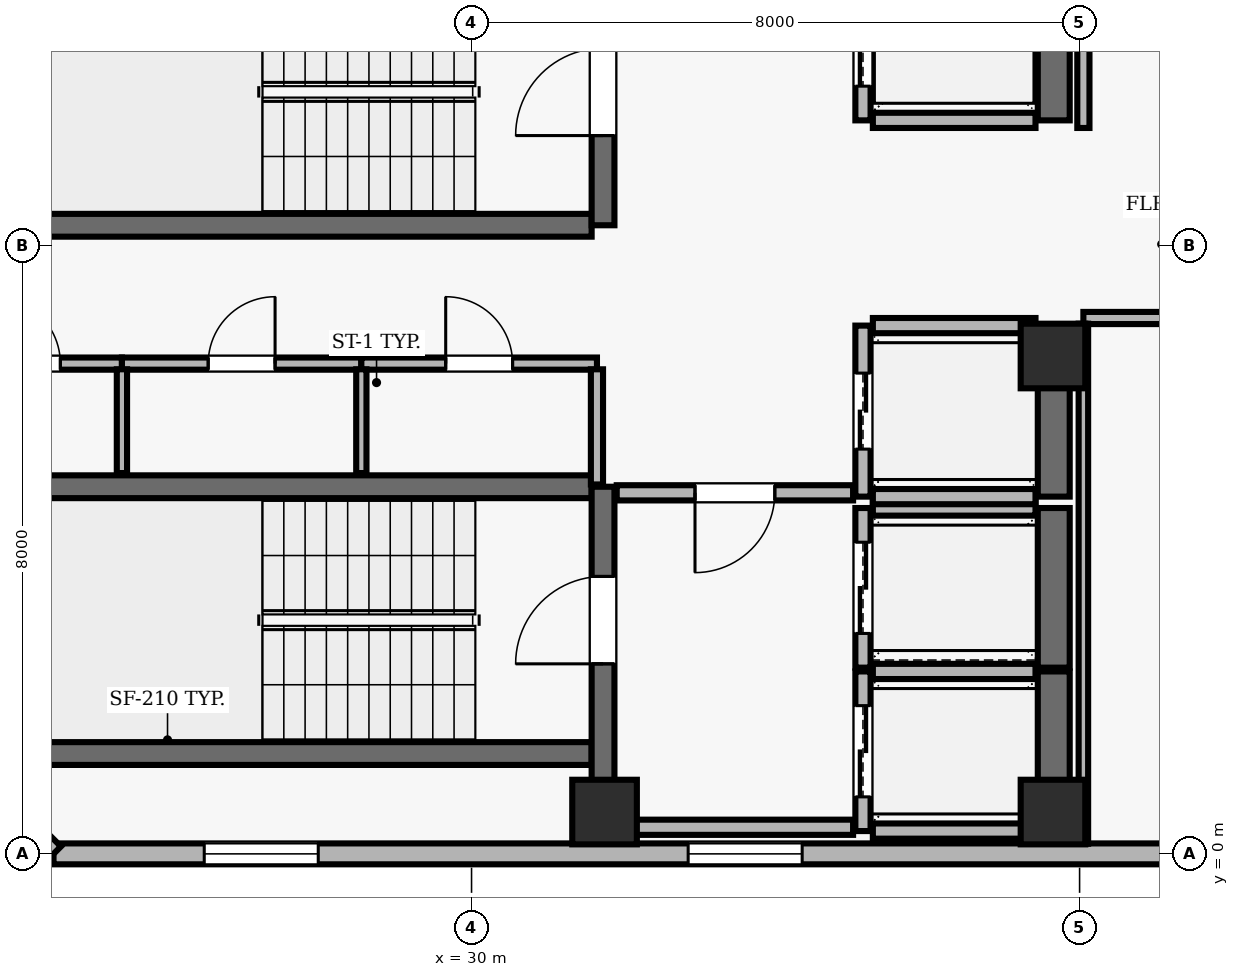
"""IFC4 building model, lengths in metres.
Left out: names, types, materials, properties, quantities, classifications, styles, units other than length and angle.
Written with IfcOpenShell. Run it as: python <this file> out.ifc"""

import sys

from ifc_helpers import new_model, si_unit, direction, frame, frame_2d, origin, origin_2d, place, context, subcontext, project, spatial, rectangle, extrude, element, fill, save


model = new_model("IFC4")
c1 = context("Model", 3, precision=1e-05, world=origin(), true_north=direction((0.0, 1.0)))
c2 = subcontext(c1, "Body", "Model", "MODEL_VIEW")
j1 = project(units=[si_unit("LENGTHUNIT", "METRE"), si_unit("PLANEANGLEUNIT", "RADIAN")], contexts=[c1])
p1 = place(None, origin())
s1 = spatial("IfcSite", under=j1, at=p1, CompositionType="ELEMENT")
p2 = place(p1, origin())
s2 = spatial("IfcBuilding", under=s1, at=p2, CompositionType="ELEMENT")
p3 = place(p2, frame((0.0, 0.0, 252.1)))
s3 = spatial("IfcBuildingStorey", under=s2, at=p3, CompositionType="ELEMENT", Elevation=252.1)
for number, where, z_axis, x_axis in (
    (1, (31.75, 0.55, 0.0), (0.0, 0.0, 1.0), (1.0, 0.0, 0.0)),
    (2, (37.65, 0.55, 0.0), (0.0, 0.0, 1.0), (1.0, 0.0, 0.0)),
    (3, (37.65, 6.55, 0.0), (0.0, 0.0, 1.0), (1.0, 0.0, 0.0)),
):
    element("IfcColumn", number, at=place(p3, frame(where, z_axis=z_axis, x_axis=x_axis)), inside=s3, PredefinedType="COLUMN", context=c2, shape_type="SweptSolid", body=[
        extrude(rectangle(XDim=0.85, YDim=0.85, at=origin_2d()), origin(), (0.0, 0.0, 1.0), 3.9),
    ])
p4 = place(p3, frame((24.5, 0.0, 0.0), z_axis=(0.0, 0.0, 1.0), x_axis=(1.0, 0.0, 0.0)))
e4 = element("IfcWall", 4, at=p4, inside=s3, PredefinedType="SOLIDWALL", context=c2, shape_type="SweptSolid", body=[
    extrude(rectangle(XDim=32.8, YDim=0.275, at=frame_2d((16.4, 0.0))), origin(), (0.0, 0.0, 1.0), 3.69),
])
p5 = place(p4, frame((1.983, 0.0, 0.9)))
e5 = element("IfcOpeningElement", 5, at=p5, cuts=e4, PredefinedType="OPENING", context=c2, shape_type="SweptSolid", body=[
    extrude(rectangle(XDim=1.5, YDim=1.6, at=frame_2d((0.75, 0.8))), frame((0.0, 0.147, 0.0), z_axis=(0.0, -1.0, 0.0), x_axis=(1.0, 0.0, 0.0)), (0.0, 0.0, 1.0), 0.295),
])
p6 = place(p4, frame((8.35, 0.0, 0.9)))
e6 = element("IfcOpeningElement", 6, at=p6, cuts=e4, PredefinedType="OPENING", context=c2, shape_type="SweptSolid", body=[
    extrude(rectangle(XDim=1.5, YDim=1.6, at=frame_2d((0.75, 0.8))), frame((0.0, 0.147, 0.0), z_axis=(0.0, -1.0, 0.0), x_axis=(1.0, 0.0, 0.0)), (0.0, 0.0, 1.0), 0.295),
])
p7 = place(p3, frame((22.0, 2.5, 0.0), z_axis=(0.0, 0.0, 1.0), x_axis=(0.707106781187, -0.707106781187, 0.0)))
e7 = element("IfcWall", 7, at=p7, inside=s3, PredefinedType="SOLIDWALL", context=c2, shape_type="SweptSolid", body=[
    extrude(rectangle(XDim=3.536, YDim=0.275, at=frame_2d((1.768, 0.0))), origin(), (0.0, 0.0, 1.0), 3.69),
])
for number, where, z_axis, x_axis in (
    (8, (31.58, 4.83, 0.0), (0.0, 0.0, 1.0), (-1.0, 0.0, 0.0)),
    (9, (23.22, 1.32, 0.0), (0.0, 0.0, 1.0), (1.0, 0.0, 0.0)),
):
    element("IfcWall", number, at=place(p3, frame(where, z_axis=z_axis, x_axis=x_axis)), inside=s3, PredefinedType="SHEAR", context=c2, shape_type="SweptSolid", body=[
        extrude(rectangle(XDim=8.36, YDim=0.3, at=frame_2d((4.18, 0.0))), origin(), (0.0, 0.0, 1.0), 3.69),
    ])
p8 = place(p3, frame((31.73, 0.96, 0.0), z_axis=(0.0, 0.0, 1.0), x_axis=(0.0, 1.0, 0.0)))
e10 = element("IfcWall", 10, at=p8, inside=s3, PredefinedType="SHEAR", context=c2, shape_type="SweptSolid", body=[
    extrude(rectangle(XDim=3.87, YDim=0.3, at=frame_2d((1.935, 0.0))), origin(), (0.0, 0.0, 1.0), 3.69),
])
p9 = place(p8, frame((1.54, 0.0, 0.0)))
e11 = element("IfcOpeningElement", 11, at=p9, cuts=e10, PredefinedType="OPENING", context=c2, shape_type="SweptSolid", body=[
    extrude(rectangle(XDim=1.15, YDim=2.15, at=frame_2d((0.575, 1.075))), frame((0.0, 0.16, 0.0), z_axis=(0.0, -1.0, 0.0), x_axis=(1.0, 0.0, 0.0)), (0.0, 0.0, 1.0), 0.32),
])
p10 = place(p3, frame((23.22, 8.27, 0.0), z_axis=(0.0, 0.0, 1.0), x_axis=(1.0, 0.0, 0.0)))
e12 = element("IfcWall", 12, at=p10, inside=s3, PredefinedType="SHEAR", context=c2, shape_type="SweptSolid", body=[
    extrude(rectangle(XDim=8.36, YDim=0.3, at=frame_2d((4.18, 0.0))), origin(), (0.0, 0.0, 1.0), 3.69),
])
p11 = place(p3, frame((31.73, 8.27, 0.0), z_axis=(0.0, 0.0, 1.0), x_axis=(0.0, 1.0, 0.0)))
e13 = element("IfcWall", 13, at=p11, inside=s3, PredefinedType="SHEAR", context=c2, shape_type="SweptSolid", body=[
    extrude(rectangle(XDim=3.51, YDim=0.3, at=frame_2d((1.755, 0.0))), origin(), (0.0, 0.0, 1.0), 3.69),
])
p12 = place(p11, frame((1.18, 0.0, 0.0)))
e14 = element("IfcOpeningElement", 14, at=p12, cuts=e13, PredefinedType="OPENING", context=c2, shape_type="SweptSolid", body=[
    extrude(rectangle(XDim=1.15, YDim=2.15, at=frame_2d((0.575, 1.075))), frame((0.0, 0.16, 0.0), z_axis=(0.0, -1.0, 0.0), x_axis=(1.0, 0.0, 0.0)), (0.0, 0.0, 1.0), 0.32),
])
p13 = place(p3, frame((35.15, 2.4, 0.0), z_axis=(0.0, 0.0, 1.0), x_axis=(0.0, -1.0, 0.0)))
e15 = element("IfcWall", 15, at=p13, inside=s3, PredefinedType="SOLIDWALL", context=c2, shape_type="SweptSolid", body=[
    extrude(rectangle(XDim=2.1, YDim=0.2, at=frame_2d((1.05, 0.0))), origin(), (0.0, 0.0, 1.0), 3.69),
])
p14 = place(p13, frame((0.45, 0.0, 0.0)))
e16 = element("IfcOpeningElement", 16, at=p14, cuts=e15, PredefinedType="OPENING", context=c2, shape_type="SweptSolid", body=[
    extrude(rectangle(XDim=1.2, YDim=2.15, at=frame_2d((0.6, 1.075))), frame((0.0, 0.11, 0.0), z_axis=(0.0, -1.0, 0.0), x_axis=(1.0, 0.0, 0.0)), (0.0, 0.0, 1.0), 0.22),
])
p15 = place(p3, frame((37.66, 0.3, 0.0), z_axis=(0.0, 0.0, 1.0), x_axis=(0.0, 1.0, 0.0)))
e17 = element("IfcWall", 17, at=p15, inside=s3, PredefinedType="SHEAR", context=c2, shape_type="SweptSolid", body=[
    extrude(rectangle(XDim=2.1, YDim=0.42, at=frame_2d((1.05, 0.0))), origin(), (0.0, 0.0, 1.0), 3.69),
])
for number, where, z_axis, x_axis in (
    (18, (35.28, 0.3, 0.0), (0.0, 0.0, 1.0), (1.0, 0.0, 0.0)),
    (19, (37.42, 2.4, 0.0), (0.0, 0.0, 1.0), (-1.0, 0.0, 0.0)),
):
    element("IfcWall", number, at=place(p3, frame(where, z_axis=z_axis, x_axis=x_axis)), inside=s3, PredefinedType="SOLIDWALL", context=c2, shape_type="SweptSolid", body=[
        extrude(rectangle(XDim=2.14, YDim=0.2, at=frame_2d((1.07, 0.0))), origin(), (0.0, 0.0, 1.0), 3.69),
    ])
p16 = place(p3, frame((35.15, 4.55, 0.0), z_axis=(0.0, 0.0, 1.0), x_axis=(0.0, -1.0, 0.0)))
e20 = element("IfcWall", 20, at=p16, inside=s3, PredefinedType="SOLIDWALL", context=c2, shape_type="SweptSolid", body=[
    extrude(rectangle(XDim=2.1, YDim=0.2, at=frame_2d((1.05, 0.0))), origin(), (0.0, 0.0, 1.0), 3.69),
])
p17 = place(p16, frame((0.45, 0.0, 0.0)))
e21 = element("IfcOpeningElement", 21, at=p17, cuts=e20, PredefinedType="OPENING", context=c2, shape_type="SweptSolid", body=[
    extrude(rectangle(XDim=1.2, YDim=2.15, at=frame_2d((0.6, 1.075))), frame((0.0, 0.11, 0.0), z_axis=(0.0, -1.0, 0.0), x_axis=(1.0, 0.0, 0.0)), (0.0, 0.0, 1.0), 0.22),
])
p18 = place(p3, frame((37.66, 2.45, 0.0), z_axis=(0.0, 0.0, 1.0), x_axis=(0.0, 1.0, 0.0)))
e22 = element("IfcWall", 22, at=p18, inside=s3, PredefinedType="SHEAR", context=c2, shape_type="SweptSolid", body=[
    extrude(rectangle(XDim=2.1, YDim=0.42, at=frame_2d((1.05, 0.0))), origin(), (0.0, 0.0, 1.0), 3.69),
])
p19 = place(p3, frame((37.42, 4.55, 0.0), z_axis=(0.0, 0.0, 1.0), x_axis=(-1.0, 0.0, 0.0)))
e23 = element("IfcWall", 23, at=p19, inside=s3, PredefinedType="SOLIDWALL", context=c2, shape_type="SweptSolid", body=[
    extrude(rectangle(XDim=2.14, YDim=0.2, at=frame_2d((1.07, 0.0))), origin(), (0.0, 0.0, 1.0), 3.69),
])
p20 = place(p3, frame((35.15, 6.95, 0.0), z_axis=(0.0, 0.0, 1.0), x_axis=(0.0, -1.0, 0.0)))
e24 = element("IfcWall", 24, at=p20, inside=s3, PredefinedType="SOLIDWALL", context=c2, shape_type="SweptSolid", body=[
    extrude(rectangle(XDim=2.25, YDim=0.2, at=frame_2d((1.125, 0.0))), origin(), (0.0, 0.0, 1.0), 3.69),
])
p21 = place(p20, frame((0.625, 0.0, 0.0)))
e25 = element("IfcOpeningElement", 25, at=p21, cuts=e24, PredefinedType="OPENING", context=c2, shape_type="SweptSolid", body=[
    extrude(rectangle(XDim=1.0, YDim=2.1, at=frame_2d((0.5, 1.05))), frame((0.0, 0.11, 0.0), z_axis=(0.0, -1.0, 0.0), x_axis=(1.0, 0.0, 0.0)), (0.0, 0.0, 1.0), 0.22),
])
p22 = place(p3, frame((37.66, 4.7, 0.0), z_axis=(0.0, 0.0, 1.0), x_axis=(0.0, 1.0, 0.0)))
e26 = element("IfcWall", 26, at=p22, inside=s3, PredefinedType="SHEAR", context=c2, shape_type="SweptSolid", body=[
    extrude(rectangle(XDim=2.25, YDim=0.42, at=frame_2d((1.125, 0.0))), origin(), (0.0, 0.0, 1.0), 3.69),
])
for number, where, z_axis, x_axis in (
    (27, (35.28, 4.7, 0.0), (0.0, 0.0, 1.0), (1.0, 0.0, 0.0)),
    (28, (37.42, 6.95, 0.0), (0.0, 0.0, 1.0), (-1.0, 0.0, 0.0)),
):
    element("IfcWall", number, at=place(p3, frame(where, z_axis=z_axis, x_axis=x_axis)), inside=s3, PredefinedType="SOLIDWALL", context=c2, shape_type="SweptSolid", body=[
        extrude(rectangle(XDim=2.14, YDim=0.2, at=frame_2d((1.07, 0.0))), origin(), (0.0, 0.0, 1.0), 3.69),
    ])
p23 = place(p3, frame((35.15, 11.55, 0.0), z_axis=(0.0, 0.0, 1.0), x_axis=(0.0, -1.0, 0.0)))
e29 = element("IfcWall", 29, at=p23, inside=s3, PredefinedType="SOLIDWALL", context=c2, shape_type="SweptSolid", body=[
    extrude(rectangle(XDim=1.9, YDim=0.2, at=frame_2d((0.95, 0.0))), origin(), (0.0, 0.0, 1.0), 3.69),
])
p24 = place(p23, frame((0.45, 0.0, 0.0)))
e30 = element("IfcOpeningElement", 30, at=p24, cuts=e29, PredefinedType="OPENING", context=c2, shape_type="SweptSolid", body=[
    extrude(rectangle(XDim=1.0, YDim=2.1, at=frame_2d((0.5, 1.05))), frame((0.0, 0.11, 0.0), z_axis=(0.0, -1.0, 0.0), x_axis=(1.0, 0.0, 0.0)), (0.0, 0.0, 1.0), 0.22),
])
p25 = place(p3, frame((37.66, 9.65, 0.0), z_axis=(0.0, 0.0, 1.0), x_axis=(0.0, 1.0, 0.0)))
e31 = element("IfcWall", 31, at=p25, inside=s3, PredefinedType="SHEAR", context=c2, shape_type="SweptSolid", body=[
    extrude(rectangle(XDim=1.9, YDim=0.42, at=frame_2d((0.95, 0.0))), origin(), (0.0, 0.0, 1.0), 3.69),
])
p26 = place(p3, frame((35.28, 9.65, 0.0), z_axis=(0.0, 0.0, 1.0), x_axis=(1.0, 0.0, 0.0)))
e32 = element("IfcWall", 32, at=p26, inside=s3, PredefinedType="SOLIDWALL", context=c2, shape_type="SweptSolid", body=[
    extrude(rectangle(XDim=2.14, YDim=0.2, at=frame_2d((1.07, 0.0))), origin(), (0.0, 0.0, 1.0), 3.69),
])
p27 = place(p3, frame((22.2, 6.45, 0.0), z_axis=(0.0, 0.0, 1.0), x_axis=(1.0, 0.0, 0.0)))
e33 = element("IfcWall", 33, at=p27, inside=s3, PredefinedType="PARTITIONING", context=c2, shape_type="SweptSolid", body=[
    extrude(rectangle(XDim=3.2, YDim=0.16, at=frame_2d((1.6, 0.0))), origin(), (0.0, 0.0, 1.0), 3.69),
])
p28 = place(p27, frame((1.51, 0.0, 0.0)))
e34 = element("IfcOpeningElement", 34, at=p28, cuts=e33, PredefinedType="OPENING", context=c2, shape_type="SweptSolid", body=[
    extrude(rectangle(XDim=0.88, YDim=2.1, at=frame_2d((0.44, 1.05))), frame((0.0, 0.09, 0.0), z_axis=(0.0, -1.0, 0.0), x_axis=(1.0, 0.0, 0.0)), (0.0, 0.0, 1.0), 0.18),
])
p29 = place(p3, frame((25.4, 6.45, 0.0), z_axis=(0.0, 0.0, 1.0), x_axis=(1.0, 0.0, 0.0)))
e35 = element("IfcWall", 35, at=p29, inside=s3, PredefinedType="PARTITIONING", context=c2, shape_type="SweptSolid", body=[
    extrude(rectangle(XDim=3.15, YDim=0.16, at=frame_2d((1.575, 0.0))), origin(), (0.0, 0.0, 1.0), 3.69),
])
p30 = place(p29, frame((1.135, 0.0, 0.0)))
e36 = element("IfcOpeningElement", 36, at=p30, cuts=e35, PredefinedType="OPENING", context=c2, shape_type="SweptSolid", body=[
    extrude(rectangle(XDim=0.88, YDim=2.1, at=frame_2d((0.44, 1.05))), frame((0.0, 0.09, 0.0), z_axis=(0.0, -1.0, 0.0), x_axis=(1.0, 0.0, 0.0)), (0.0, 0.0, 1.0), 0.18),
])
p31 = place(p3, frame((28.55, 6.45, 0.0), z_axis=(0.0, 0.0, 1.0), x_axis=(1.0, 0.0, 0.0)))
e37 = element("IfcWall", 37, at=p31, inside=s3, PredefinedType="PARTITIONING", context=c2, shape_type="SweptSolid", body=[
    extrude(rectangle(XDim=3.1, YDim=0.16, at=frame_2d((1.55, 0.0))), origin(), (0.0, 0.0, 1.0), 3.69),
])
p32 = place(p31, frame((1.11, 0.0, 0.0)))
e38 = element("IfcOpeningElement", 38, at=p32, cuts=e37, PredefinedType="OPENING", context=c2, shape_type="SweptSolid", body=[
    extrude(rectangle(XDim=0.88, YDim=2.1, at=frame_2d((0.44, 1.05))), frame((0.0, 0.09, 0.0), z_axis=(0.0, -1.0, 0.0), x_axis=(1.0, 0.0, 0.0)), (0.0, 0.0, 1.0), 0.18),
])
p33 = place(p3, frame((31.65, 0.35, 0.0), z_axis=(0.0, 0.0, 1.0), x_axis=(1.0, 0.0, 0.0)))
e39 = element("IfcWall", 39, at=p33, inside=s3, PredefinedType="SOLIDWALL", context=c2, shape_type="SweptSolid", body=[
    extrude(rectangle(XDim=3.37, YDim=0.2, at=frame_2d((1.685, 0.0))), origin(), (0.0, 0.0, 1.0), 3.69),
])
p34 = place(p3, frame((35.02, 4.75, 0.0), z_axis=(0.0, 0.0, 1.0), x_axis=(-1.0, 0.0, 0.0)))
e40 = element("IfcWall", 40, at=p34, inside=s3, PredefinedType="SOLIDWALL", context=c2, shape_type="SweptSolid", body=[
    extrude(rectangle(XDim=3.11, YDim=0.2, at=frame_2d((1.555, 0.0))), origin(), (0.0, 0.0, 1.0), 3.69),
])
p35 = place(p34, frame((1.03, 0.0, 0.0)))
e41 = element("IfcOpeningElement", 41, at=p35, cuts=e40, PredefinedType="OPENING", context=c2, shape_type="SweptSolid", body=[
    extrude(rectangle(XDim=1.05, YDim=2.15, at=frame_2d((0.525, 1.075))), frame((0.0, 0.11, 0.0), z_axis=(0.0, -1.0, 0.0), x_axis=(1.0, 0.0, 0.0)), (0.0, 0.0, 1.0), 0.22),
])
p36 = place(p3, frame((38.05, 7.05, 0.0), z_axis=(0.0, 0.0, 1.0), x_axis=(1.0, 0.0, 0.0)))
e42 = element("IfcWall", 42, at=p36, inside=s3, PredefinedType="PARTITIONING", context=c2, shape_type="SweptSolid", body=[
    extrude(rectangle(XDim=5.35, YDim=0.16, at=frame_2d((2.675, 0.0))), origin(), (0.0, 0.0, 1.0), 3.69),
])
p37 = place(p36, frame((2.175, 0.0, 0.0)))
e43 = element("IfcOpeningElement", 43, at=p37, cuts=e42, PredefinedType="OPENING", context=c2, shape_type="SweptSolid", body=[
    extrude(rectangle(XDim=1.0, YDim=2.1, at=frame_2d((0.5, 1.05))), frame((0.0, 0.09, 0.0), z_axis=(0.0, -1.0, 0.0), x_axis=(1.0, 0.0, 0.0)), (0.0, 0.0, 1.0), 0.18),
])
for number, where, z_axis, x_axis in (
    (44, (25.4, 5.01, 0.0), (0.0, 0.0, 1.0), (0.0, 1.0, 0.0)),
    (45, (28.55, 5.01, 0.0), (0.0, 0.0, 1.0), (0.0, 1.0, 0.0)),
):
    element("IfcWall", number, at=place(p3, frame(where, z_axis=z_axis, x_axis=x_axis)), inside=s3, PredefinedType="PARTITIONING", context=c2, shape_type="SweptSolid", body=[
        extrude(rectangle(XDim=1.365, YDim=0.135, at=frame_2d((0.683, 0.0))), origin(), (0.0, 0.0, 1.0), 3.69),
    ])
p38 = place(p3, frame((31.65, 4.86, 0.0), z_axis=(0.0, 0.0, 1.0), x_axis=(0.0, 1.0, 0.0)))
e46 = element("IfcWall", 46, at=p38, inside=s3, PredefinedType="PARTITIONING", context=c2, shape_type="SweptSolid", body=[
    extrude(rectangle(XDim=1.515, YDim=0.16, at=frame_2d((0.757, 0.0))), origin(), (0.0, 0.0, 1.0), 3.69),
])
p39 = place(p3, frame((38.05, 6.975, 0.0), z_axis=(0.0, 0.0, 1.0), x_axis=(0.0, -1.0, 0.0)))
e47 = element("IfcWall", 47, at=p39, inside=s3, PredefinedType="PARTITIONING", context=c2, shape_type="SweptSolid", body=[
    extrude(rectangle(XDim=6.842, YDim=0.125, at=frame_2d((3.421, 0.0))), origin(), (0.0, 0.0, 1.0), 3.227),
])
p40 = place(p3, frame((38.05, 15.925, 0.0), z_axis=(0.0, 0.0, 1.0), x_axis=(0.0, -1.0, 0.0)))
e48 = element("IfcWall", 48, at=p40, inside=s3, PredefinedType="PARTITIONING", context=c2, shape_type="SweptSolid", body=[
    extrude(rectangle(XDim=6.375, YDim=0.16, at=frame_2d((3.188, 0.0))), origin(), (0.0, 0.0, 1.0), 3.227),
])
p41 = place(p5, origin())
e49 = element("IfcWindow", 49, at=p41, inside=s3, PartitioningType="SINGLE_PANEL", PredefinedType="WINDOW", context=c2, shape_type="SweptSolid", body=[
    extrude(rectangle(XDim=1.5, YDim=1.6, at=frame_2d((0.75, 0.8))), frame((0.0, 0.03, 0.0), z_axis=(0.0, -1.0, 0.0), x_axis=(1.0, 0.0, 0.0)), (0.0, 0.0, 1.0), 0.06),
])
fill(e5, e49)
p42 = place(p6, origin())
e50 = element("IfcWindow", 50, at=p42, inside=s3, PartitioningType="SINGLE_PANEL", PredefinedType="WINDOW", context=c2, shape_type="SweptSolid", body=[
    extrude(rectangle(XDim=1.5, YDim=1.6, at=frame_2d((0.75, 0.8))), frame((0.0, 0.03, 0.0), z_axis=(0.0, -1.0, 0.0), x_axis=(1.0, 0.0, 0.0)), (0.0, 0.0, 1.0), 0.06),
])
fill(e6, e50)
p43 = place(p9, origin())
e51 = element("IfcDoor", 51, at=p43, inside=s3, OperationType="SINGLE_SWING_LEFT", PredefinedType="DOOR", context=c2, shape_type="SweptSolid", body=[
    extrude(rectangle(XDim=1.15, YDim=2.15, at=frame_2d((0.575, 1.075))), frame((0.0, 0.025, 0.0), z_axis=(0.0, -1.0, 0.0), x_axis=(1.0, 0.0, 0.0)), (0.0, 0.0, 1.0), 0.05),
])
fill(e11, e51)
p44 = place(p12, origin())
e52 = element("IfcDoor", 52, at=p44, inside=s3, OperationType="SINGLE_SWING_LEFT", PredefinedType="DOOR", context=c2, shape_type="SweptSolid", body=[
    extrude(rectangle(XDim=1.15, YDim=2.15, at=frame_2d((0.575, 1.075))), frame((0.0, 0.025, 0.0), z_axis=(0.0, -1.0, 0.0), x_axis=(1.0, 0.0, 0.0)), (0.0, 0.0, 1.0), 0.05),
])
fill(e14, e52)
p45 = place(p14, origin())
e53 = element("IfcDoor", 53, at=p45, inside=s3, OperationType="DOUBLE_DOOR_SLIDING", PredefinedType="DOOR", context=c2, shape_type="SweptSolid", body=[
    extrude(rectangle(XDim=1.2, YDim=2.15, at=frame_2d((0.6, 1.075))), frame((0.0, 0.025, 0.0), z_axis=(0.0, -1.0, 0.0), x_axis=(1.0, 0.0, 0.0)), (0.0, 0.0, 1.0), 0.05),
])
fill(e16, e53)
p46 = place(p17, origin())
e54 = element("IfcDoor", 54, at=p46, inside=s3, OperationType="DOUBLE_DOOR_SLIDING", PredefinedType="DOOR", context=c2, shape_type="SweptSolid", body=[
    extrude(rectangle(XDim=1.2, YDim=2.15, at=frame_2d((0.6, 1.075))), frame((0.0, 0.025, 0.0), z_axis=(0.0, -1.0, 0.0), x_axis=(1.0, 0.0, 0.0)), (0.0, 0.0, 1.0), 0.05),
])
fill(e21, e54)
p47 = place(p21, origin())
e55 = element("IfcDoor", 55, at=p47, inside=s3, OperationType="DOUBLE_DOOR_SLIDING", PredefinedType="DOOR", context=c2, shape_type="SweptSolid", body=[
    extrude(rectangle(XDim=1.0, YDim=2.1, at=frame_2d((0.5, 1.05))), frame((0.0, 0.025, 0.0), z_axis=(0.0, -1.0, 0.0), x_axis=(1.0, 0.0, 0.0)), (0.0, 0.0, 1.0), 0.05),
])
fill(e25, e55)
p48 = place(p24, origin())
e56 = element("IfcDoor", 56, at=p48, inside=s3, OperationType="DOUBLE_DOOR_SLIDING", PredefinedType="DOOR", context=c2, shape_type="SweptSolid", body=[
    extrude(rectangle(XDim=1.0, YDim=2.1, at=frame_2d((0.5, 1.05))), frame((0.0, 0.025, 0.0), z_axis=(0.0, -1.0, 0.0), x_axis=(1.0, 0.0, 0.0)), (0.0, 0.0, 1.0), 0.05),
])
fill(e30, e56)
p49 = place(p35, origin())
e57 = element("IfcDoor", 57, at=p49, inside=s3, OperationType="SINGLE_SWING_RIGHT", PredefinedType="DOOR", context=c2, shape_type="SweptSolid", body=[
    extrude(rectangle(XDim=1.05, YDim=2.15, at=frame_2d((0.525, 1.075))), frame((0.0, 0.025, 0.0), z_axis=(0.0, -1.0, 0.0), x_axis=(1.0, 0.0, 0.0)), (0.0, 0.0, 1.0), 0.05),
])
fill(e41, e57)
p50 = place(p28, origin())
e58 = element("IfcDoor", 58, at=p50, inside=s3, OperationType="SINGLE_SWING_LEFT", PredefinedType="DOOR", context=c2, shape_type="SweptSolid", body=[
    extrude(rectangle(XDim=0.88, YDim=2.1, at=frame_2d((0.44, 1.05))), frame((0.0, 0.025, 0.0), z_axis=(0.0, -1.0, 0.0), x_axis=(1.0, 0.0, 0.0)), (0.0, 0.0, 1.0), 0.05),
])
fill(e34, e58)
p51 = place(p30, origin())
e59 = element("IfcDoor", 59, at=p51, inside=s3, OperationType="SINGLE_SWING_RIGHT", PredefinedType="DOOR", context=c2, shape_type="SweptSolid", body=[
    extrude(rectangle(XDim=0.88, YDim=2.1, at=frame_2d((0.44, 1.05))), frame((0.0, 0.025, 0.0), z_axis=(0.0, -1.0, 0.0), x_axis=(1.0, 0.0, 0.0)), (0.0, 0.0, 1.0), 0.05),
])
fill(e36, e59)
p52 = place(p32, origin())
e60 = element("IfcDoor", 60, at=p52, inside=s3, OperationType="SINGLE_SWING_LEFT", PredefinedType="DOOR", context=c2, shape_type="SweptSolid", body=[
    extrude(rectangle(XDim=0.88, YDim=2.1, at=frame_2d((0.44, 1.05))), frame((0.0, 0.025, 0.0), z_axis=(0.0, -1.0, 0.0), x_axis=(1.0, 0.0, 0.0)), (0.0, 0.0, 1.0), 0.05),
])
fill(e38, e60)
save(model, sys.argv[1])
